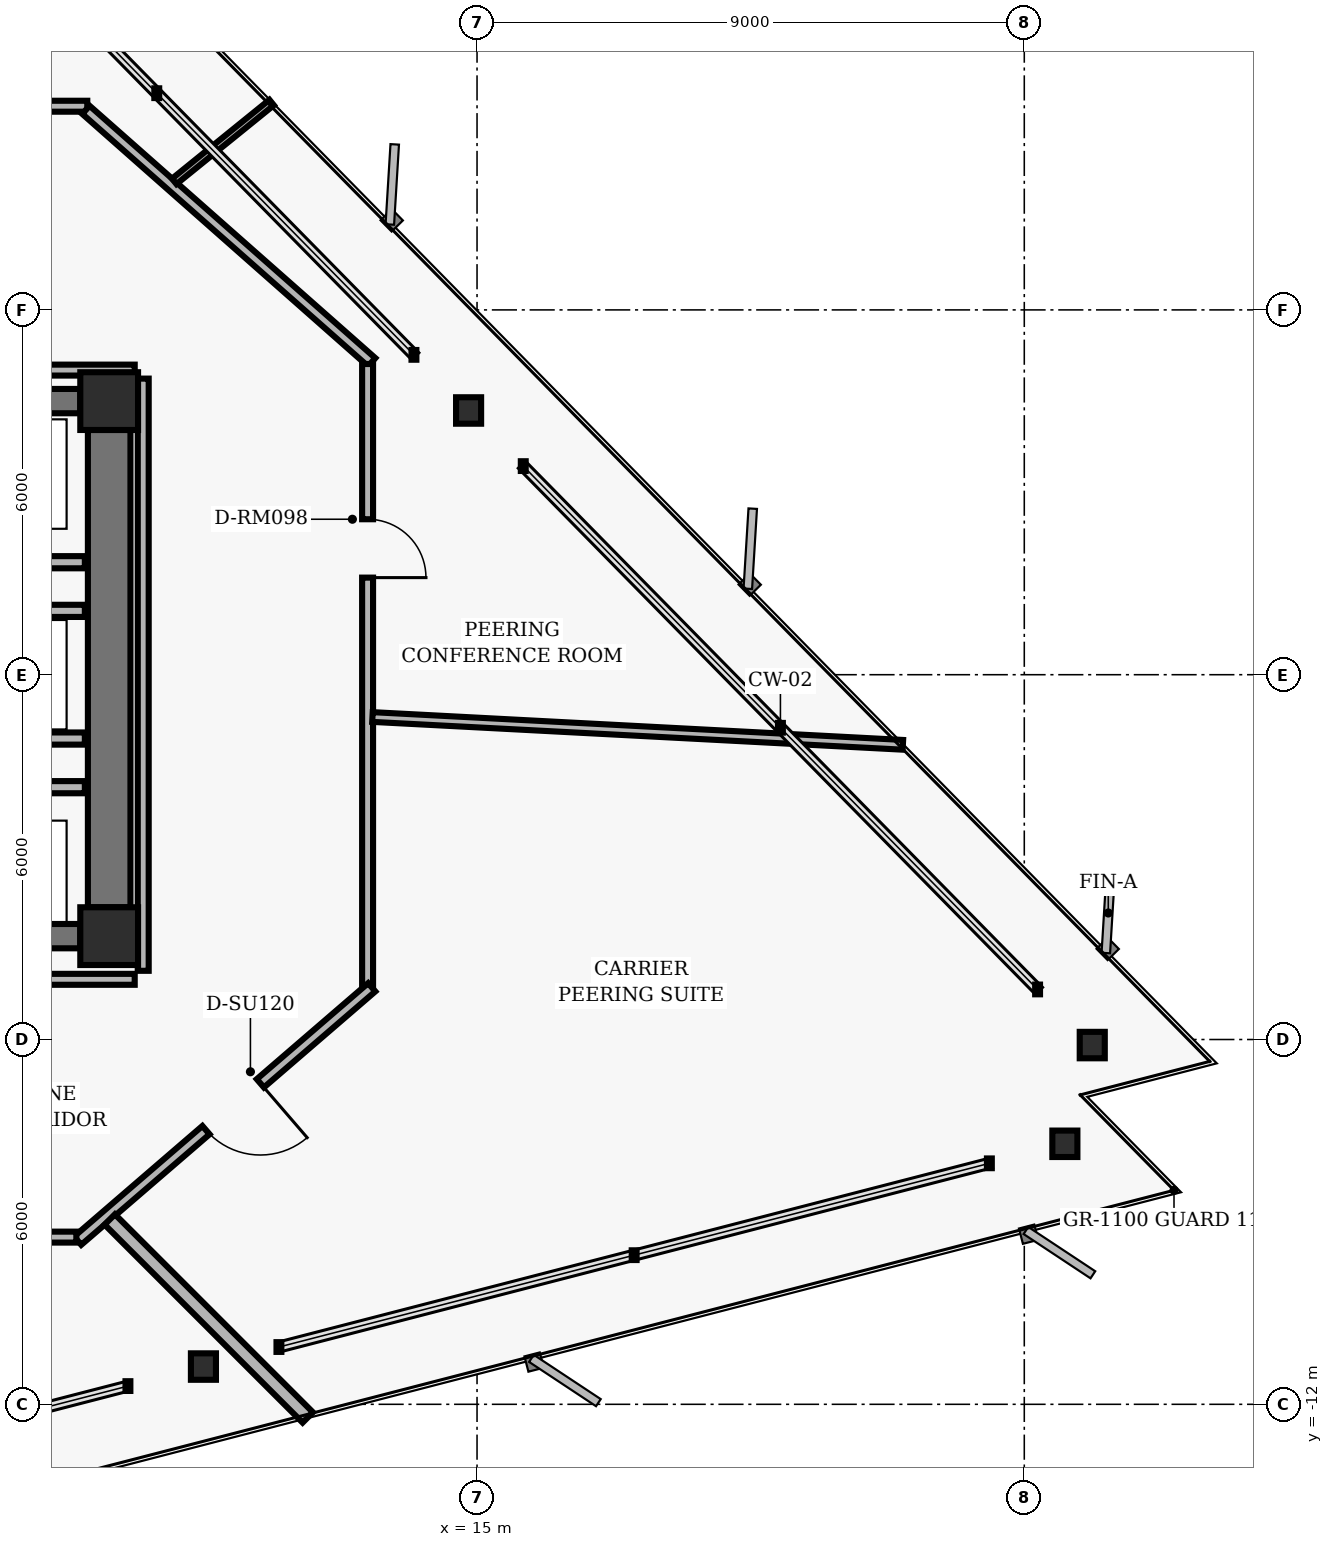
"""IFC4 building model, lengths in metres.
Left out: names, types, materials, properties, quantities, classifications, styles, units other than length and angle.
Written with IfcOpenShell. Run it as: python <this file> out.ifc"""

import sys

from ifc_helpers import new_model, si_unit, direction, frame, frame_2d, origin, origin_2d, place, context, subcontext, project, spatial, rectangle, hollow_rectangle, i_section, extrude, element, fill, save


model = new_model("IFC4")
c1 = context("Model", 3, precision=1e-05, world=origin(), true_north=direction((0.0, 1.0)))
c2 = subcontext(c1, "Body", "Model", "MODEL_VIEW")
j1 = project(units=[si_unit("LENGTHUNIT", "METRE"), si_unit("PLANEANGLEUNIT", "RADIAN")], contexts=[c1])
p1 = place(None, origin())
s1 = spatial("IfcSite", under=j1, at=p1, CompositionType="ELEMENT")
p2 = place(p1, origin())
s2 = spatial("IfcBuilding", under=s1, at=p2, CompositionType="ELEMENT")
p3 = place(p2, frame((0.0, 0.0, 94.72)))
s3 = spatial("IfcBuildingStorey", under=s2, at=p3, CompositionType="ELEMENT", Elevation=94.72)
for number, where, z_axis, x_axis in (
    (1, (8.95, 4.5, 0.0), (0.0, 0.0, 1.0), (1.0, 0.0, 0.0)),
    (2, (8.95, -4.3, 0.0), (0.0, 0.0, 1.0), (1.0, 0.0, 0.0)),
):
    element("IfcColumn", number, at=place(p3, frame(where, z_axis=z_axis, x_axis=x_axis)), inside=s3, PredefinedType="COLUMN", context=c2, shape_type="SweptSolid", body=[
        extrude(hollow_rectangle(XDim=0.95, YDim=0.95, WallThickness=0.06, InnerFilletRadius=0.02, OuterFilletRadius=0.04, at=origin_2d()), origin(), (0.0, 0.0, 1.0), 3.04),
    ])
p4 = place(p3, frame((8.95, -3.825, 0.0), z_axis=(0.0, 0.0, 1.0), x_axis=(0.0, 1.0, 0.0)))
e3 = element("IfcWall", 3, at=p4, inside=s3, PredefinedType="SHEAR", context=c2, shape_type="SweptSolid", body=[
    extrude(rectangle(XDim=7.85, YDim=0.7, at=frame_2d((3.925, 0.0))), origin(), (0.0, 0.0, 1.0), 2.788),
])
for number, where, z_axis, x_axis in (
    (4, (6.525, 4.5, 0.0), (0.0, 0.0, 1.0), (1.0, 0.0, 0.0)),
    (5, (6.525, -4.3, 0.0), (0.0, 0.0, 1.0), (1.0, 0.0, 0.0)),
):
    element("IfcWall", number, at=place(p3, frame(where, z_axis=z_axis, x_axis=x_axis)), inside=s3, PredefinedType="SHEAR", context=c2, shape_type="SweptSolid", body=[
        extrude(rectangle(XDim=1.95, YDim=0.4, at=frame_2d((0.975, 0.0))), origin(), (0.0, 0.0, 1.0), 2.788),
    ])
for number, where, z_axis, x_axis in (
    (6, (25.118, -6.092, 0.0), (0.0, 0.0, 1.0), (1.0, 0.0, 0.0)),
    (7, (14.861, 4.346, 0.0), (0.0, 0.0, 1.0), (1.0, 0.0, 0.0)),
    (8, (10.5, -11.379, 0.0), (0.0, 0.0, 1.0), (1.0, 0.0, 0.0)),
    (9, (24.667, -7.715, 0.0), (0.0, 0.0, 1.0), (1.0, 0.0, 0.0)),
):
    element("IfcColumn", number, at=place(p3, frame(where, z_axis=z_axis, x_axis=x_axis)), inside=s3, PredefinedType="COLUMN", context=c2, shape_type="SweptSolid", body=[
        extrude(i_section(OverallWidth=0.412, OverallDepth=0.435, WebThickness=0.036, FlangeThickness=0.057, FilletRadius=0.022, at=origin_2d()), origin(), (0.0, 0.0, 1.0), 3.04),
    ])
for number, where, z_axis, x_axis in (
    (10, (6.45, -1.85, 0.0), (0.0, 0.0, 1.0), (1.0, 0.0, 0.0)),
    (11, (6.45, 1.85, 0.0), (0.0, 0.0, 1.0), (1.0, 0.0, 0.0)),
):
    element("IfcWall", number, at=place(p3, frame(where, z_axis=z_axis, x_axis=x_axis)), inside=s3, PredefinedType="PARTITIONING", context=c2, shape_type="SweptSolid", body=[
        extrude(rectangle(XDim=2.1, YDim=0.2, at=frame_2d((1.05, 0.0))), origin(), (0.0, 0.0, 1.0), 2.763),
    ])
for number, where, z_axis, x_axis in (
    (12, (6.64, -1.05, 0.0), (0.0, 0.0, 1.0), (1.0, 0.0, 0.0)),
    (13, (6.64, 1.05, 0.0), (0.0, 0.0, 1.0), (1.0, 0.0, 0.0)),
):
    element("IfcWall", number, at=place(p3, frame(where, z_axis=z_axis, x_axis=x_axis)), inside=s3, PredefinedType="PARTITIONING", context=c2, shape_type="SweptSolid", body=[
        extrude(rectangle(XDim=1.91, YDim=0.2, at=frame_2d((0.955, 0.0))), origin(), (0.0, 0.0, 1.0), 2.763),
    ])
p5 = place(p3, frame((-8.59, 9.35, 0.0), z_axis=(0.0, 0.0, 1.0), x_axis=(1.0, 0.0, 0.0)))
e14 = element("IfcWall", 14, at=p5, inside=s3, PredefinedType="PARTITIONING", context=c2, shape_type="SweptSolid", body=[
    extrude(rectangle(XDim=17.18, YDim=0.18, at=frame_2d((8.59, 0.0))), origin(), (0.0, 0.0, 1.0), 2.277),
])
p6 = place(p5, frame((12.912, 0.0, 0.0)))
e15 = element("IfcOpeningElement", 15, at=p6, cuts=e14, PredefinedType="OPENING", context=c2, shape_type="SweptSolid", body=[
    extrude(rectangle(XDim=1.18, YDim=2.02, at=frame_2d((0.59, 1.01))), frame((0.0, 0.1, 0.0), z_axis=(0.0, -1.0, 0.0), x_axis=(1.0, 0.0, 0.0)), (0.0, 0.0, 1.0), 0.2),
])
p7 = place(p5, frame((5.79, 0.0, 0.0)))
e16 = element("IfcOpeningElement", 16, at=p7, cuts=e14, PredefinedType="OPENING", context=c2, shape_type="SweptSolid", body=[
    extrude(rectangle(XDim=0.96, YDim=2.02, at=frame_2d((0.48, 1.01))), frame((0.0, 0.1, 0.0), z_axis=(0.0, -1.0, 0.0), x_axis=(1.0, 0.0, 0.0)), (0.0, 0.0, 1.0), 0.2),
])
p8 = place(p3, frame((8.567, 9.29, 0.0), z_axis=(0.0, 0.0, 1.0), x_axis=(0.749626463267, -0.66186113768, 0.0)))
e17 = element("IfcWall", 17, at=p8, inside=s3, PredefinedType="PARTITIONING", context=c2, shape_type="SweptSolid", body=[
    extrude(rectangle(XDim=6.27, YDim=0.18, at=frame_2d((3.135, 0.0))), origin(), (0.0, 0.0, 1.0), 2.277),
])
p9 = place(p3, frame((13.2, 5.11, 0.0), z_axis=(0.0, 0.0, 1.0), x_axis=(0.0, -1.0, 0.0)))
e18 = element("IfcWall", 18, at=p9, inside=s3, PredefinedType="PARTITIONING", context=c2, shape_type="SweptSolid", body=[
    extrude(rectangle(XDim=10.22, YDim=0.18, at=frame_2d((5.11, 0.0))), origin(), (0.0, 0.0, 1.0), 2.277),
])
p10 = place(p9, frame((2.553, 0.0, 0.0)))
e19 = element("IfcOpeningElement", 19, at=p10, cuts=e18, PredefinedType="OPENING", context=c2, shape_type="SweptSolid", body=[
    extrude(rectangle(XDim=0.96, YDim=2.02, at=frame_2d((0.48, 1.01))), frame((0.0, 0.1, 0.0), z_axis=(0.0, -1.0, 0.0), x_axis=(1.0, 0.0, 0.0)), (0.0, 0.0, 1.0), 0.2),
])
p11 = place(p3, frame((13.268, -5.141, 0.0), z_axis=(0.0, 0.0, 1.0), x_axis=(-0.757534501725, -0.65279512766, 0.0)))
e20 = element("IfcWall", 20, at=p11, inside=s3, PredefinedType="PARTITIONING", context=c2, shape_type="SweptSolid", body=[
    extrude(rectangle(XDim=6.385, YDim=0.18, at=frame_2d((3.192, 0.0))), origin(), (0.0, 0.0, 1.0), 2.763),
])
p12 = place(p11, frame((2.418, 0.0, 0.0)))
e21 = element("IfcOpeningElement", 21, at=p12, cuts=e20, PredefinedType="OPENING", context=c2, shape_type="SweptSolid", body=[
    extrude(rectangle(XDim=1.18, YDim=2.02, at=frame_2d((0.59, 1.01))), frame((0.0, 0.1, 0.0), z_axis=(0.0, -1.0, 0.0), x_axis=(1.0, 0.0, 0.0)), (0.0, 0.0, 1.0), 0.2),
])
p13 = place(p3, frame((8.41, -9.25, 0.0), z_axis=(0.0, 0.0, 1.0), x_axis=(-1.0, 0.0, 0.0)))
e22 = element("IfcWall", 22, at=p13, inside=s3, PredefinedType="PARTITIONING", context=c2, shape_type="SweptSolid", body=[
    extrude(rectangle(XDim=17.0, YDim=0.18, at=frame_2d((8.5, 0.0))), origin(), (0.0, 0.0, 1.0), 2.277),
])
p14 = place(p13, frame((10.795, 0.0, 0.0)))
e23 = element("IfcOpeningElement", 23, at=p14, cuts=e22, PredefinedType="OPENING", context=c2, shape_type="SweptSolid", body=[
    extrude(rectangle(XDim=0.96, YDim=2.02, at=frame_2d((0.48, 1.01))), frame((0.0, 0.1, 0.0), z_axis=(0.0, -1.0, 0.0), x_axis=(1.0, 0.0, 0.0)), (0.0, 0.0, 1.0), 0.2),
])
p15 = place(p13, frame((3.417, 0.0, 0.0)))
e24 = element("IfcOpeningElement", 24, at=p15, cuts=e22, PredefinedType="OPENING", context=c2, shape_type="SweptSolid", body=[
    extrude(rectangle(XDim=1.02, YDim=2.02, at=frame_2d((0.51, 1.01))), frame((0.0, 0.1, 0.0), z_axis=(0.0, -1.0, 0.0), x_axis=(1.0, 0.0, 0.0)), (0.0, 0.0, 1.0), 0.2),
])
p16 = place(p3, frame((6.03, -5.01, 0.0), z_axis=(0.0, 0.0, 1.0), x_axis=(1.0, 0.0, 0.0)))
e25 = element("IfcWall", 25, at=p16, inside=s3, PredefinedType="PARTITIONING", context=c2, shape_type="SweptSolid", body=[
    extrude(rectangle(XDim=3.34, YDim=0.18, at=frame_2d((1.67, 0.0))), origin(), (0.0, 0.0, 1.0), 2.763),
])
p17 = place(p3, frame((9.51, -4.87, 0.0), z_axis=(0.0, 0.0, 1.0), x_axis=(0.0, 1.0, 0.0)))
e26 = element("IfcWall", 26, at=p17, inside=s3, PredefinedType="PARTITIONING", context=c2, shape_type="SweptSolid", body=[
    extrude(rectangle(XDim=9.74, YDim=0.18, at=frame_2d((4.87, 0.0))), origin(), (0.0, 0.0, 1.0), 2.048),
])
p18 = place(p3, frame((9.37, 5.01, 0.0), z_axis=(0.0, 0.0, 1.0), x_axis=(-1.0, 0.0, 0.0)))
e27 = element("IfcWall", 27, at=p18, inside=s3, PredefinedType="PARTITIONING", context=c2, shape_type="SweptSolid", body=[
    extrude(rectangle(XDim=2.808, YDim=0.18, at=frame_2d((1.404, 0.0))), origin(), (0.0, 0.0, 1.0), 2.763),
])
p19 = place(p3, frame((8.96, -8.96, 0.0), z_axis=(0.0, 0.0, 1.0), x_axis=(0.707106781187, -0.707106781187, 0.0)))
e28 = element("IfcWall", 28, at=p19, inside=s3, PredefinedType="PARTITIONING", context=c2, shape_type="SweptSolid", body=[
    extrude(rectangle(XDim=4.605, YDim=0.24, at=frame_2d((2.303, 0.0))), origin(), (0.0, 0.0, 1.0), 2.763),
])
p20 = place(p3, frame((13.28, -0.696, 0.0), z_axis=(0.0, 0.0, 1.0), x_axis=(0.998630385284, -0.052319724644, 0.0)))
e29 = element("IfcWall", 29, at=p20, inside=s3, PredefinedType="PARTITIONING", context=c2, shape_type="SweptSolid", body=[
    extrude(rectangle(XDim=8.735, YDim=0.16, at=frame_2d((4.368, 0.0))), origin(), (0.0, 0.0, 1.0), 2.763),
])
p21 = place(p3, frame((10.02, 8.114, 0.0), z_axis=(0.0, 0.0, 1.0), x_axis=(0.777156579316, 0.62930727886, 0.0)))
e30 = element("IfcWall", 30, at=p21, inside=s3, PredefinedType="MOVABLE", context=c2, shape_type="SweptSolid", body=[
    extrude(rectangle(XDim=2.061, YDim=0.115, at=frame_2d((1.03, 0.0))), origin(), (0.0, 0.0, 1.0), 2.763),
])
p22 = place(p12, origin())
e31 = element("IfcDoor", 31, at=p22, inside=s3, OperationType="SINGLE_SWING_LEFT", PredefinedType="DOOR", context=c2, shape_type="SweptSolid", body=[
    extrude(rectangle(XDim=1.18, YDim=2.02, at=frame_2d((0.59, 1.01))), frame((0.0, 0.025, 0.0), z_axis=(0.0, -1.0, 0.0), x_axis=(1.0, 0.0, 0.0)), (0.0, 0.0, 1.0), 0.05),
])
fill(e21, e31)
p23 = place(p10, origin())
e32 = element("IfcDoor", 32, at=p23, inside=s3, OperationType="SINGLE_SWING_RIGHT", PredefinedType="DOOR", context=c2, shape_type="SweptSolid", body=[
    extrude(rectangle(XDim=0.96, YDim=2.02, at=frame_2d((0.48, 1.01))), frame((0.0, 0.025, 0.0), z_axis=(0.0, -1.0, 0.0), x_axis=(1.0, 0.0, 0.0)), (0.0, 0.0, 1.0), 0.05),
])
fill(e19, e32)
save(model, sys.argv[1])
